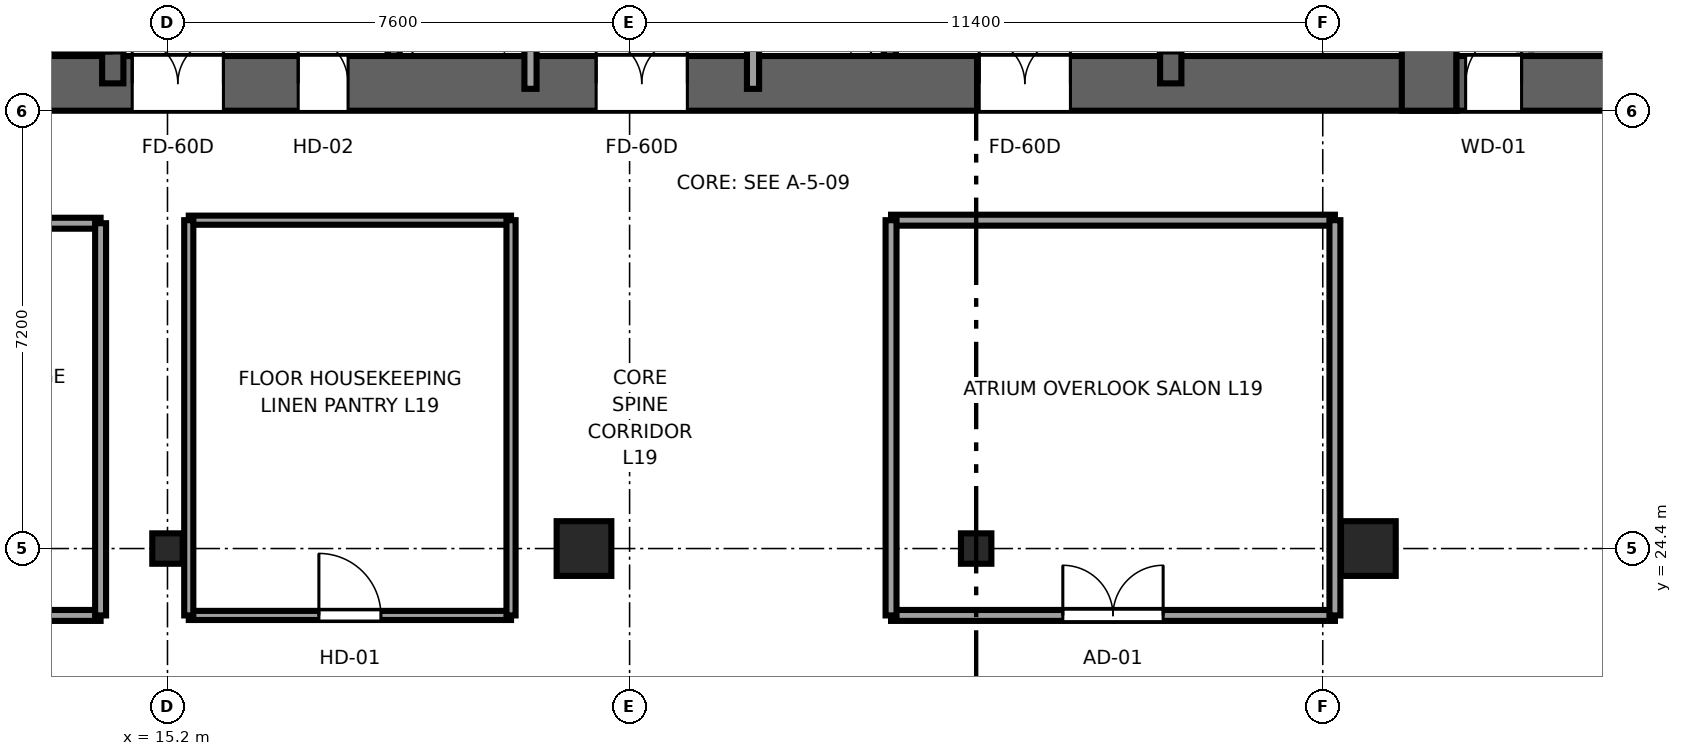
"""IFC4 building model, lengths in metres.
Left out: names, types, materials, properties, quantities, classifications, styles, units other than length and angle.
Written with IfcOpenShell. Run it as: python <this file> out.ifc"""

import sys

from ifc_helpers import new_model, si_unit, direction, frame, frame_2d, origin, origin_2d, place, context, subcontext, project, spatial, rectangle, i_section, extrude, source, transform, mapped, element, fill, save


model = new_model("IFC4")
c1 = context("Model", 3, precision=1e-05, world=origin(), true_north=direction((0.0, 1.0)))
c2 = subcontext(c1, "Body", "Model", "MODEL_VIEW")
j1 = project(units=[si_unit("LENGTHUNIT", "METRE"), si_unit("PLANEANGLEUNIT", "RADIAN")], contexts=[c1])
p1 = place(None, origin())
s1 = spatial("IfcSite", under=j1, at=p1, CompositionType="ELEMENT")
p2 = place(p1, origin())
s2 = spatial("IfcBuilding", under=s1, at=p2, CompositionType="ELEMENT")
p3 = place(p2, frame((0.0, 0.0, 78.15)))
s3 = spatial("IfcBuildingStorey", under=s2, at=p3, CompositionType="ELEMENT", Elevation=78.15)
p4 = place(p3, frame((9.6, 32.05, 0.0), z_axis=(0.0, 0.0, 1.0), x_axis=(1.0, 0.0, 0.0)))
e1 = element("IfcWall", 1, at=p4, inside=s3, PredefinedType="SHEAR", context=c2, shape_type="SweptSolid", body=[
    extrude(rectangle(XDim=26.8, YDim=0.9, at=frame_2d((13.4, 0.0))), origin(), (0.0, 0.0, 1.0), 3.55),
])
p5 = place(p4, frame((6.52, 0.0, 0.0), z_axis=(0.0, 0.0, 1.0), x_axis=(-1.0, 0.0, 0.0)))
e2 = element("IfcOpeningElement", 2, at=p5, cuts=e1, PredefinedType="OPENING", context=c2, shape_type="SweptSolid", body=[
    extrude(rectangle(XDim=1.5, YDim=2.04, at=frame_2d((0.75, 1.02))), frame((0.0, 0.46, 0.0), z_axis=(0.0, -1.0, 0.0), x_axis=(1.0, 0.0, 0.0)), (0.0, 0.0, 1.0), 0.92),
])
p6 = place(p4, frame((14.15, 0.0, 0.0), z_axis=(0.0, 0.0, 1.0), x_axis=(-1.0, 0.0, 0.0)))
e3 = element("IfcOpeningElement", 3, at=p6, cuts=e1, PredefinedType="OPENING", context=c2, shape_type="SweptSolid", body=[
    extrude(rectangle(XDim=1.5, YDim=2.04, at=frame_2d((0.75, 1.02))), frame((0.0, 0.46, 0.0), z_axis=(0.0, -1.0, 0.0), x_axis=(1.0, 0.0, 0.0)), (0.0, 0.0, 1.0), 0.92),
])
p7 = place(p4, frame((20.45, 0.0, 0.0), z_axis=(0.0, 0.0, 1.0), x_axis=(-1.0, 0.0, 0.0)))
e4 = element("IfcOpeningElement", 4, at=p7, cuts=e1, PredefinedType="OPENING", context=c2, shape_type="SweptSolid", body=[
    extrude(rectangle(XDim=1.5, YDim=2.04, at=frame_2d((0.75, 1.02))), frame((0.0, 0.46, 0.0), z_axis=(0.0, -1.0, 0.0), x_axis=(1.0, 0.0, 0.0)), (0.0, 0.0, 1.0), 0.92),
])
p8 = place(p4, frame((8.57, 0.0, 0.0), z_axis=(0.0, 0.0, 1.0), x_axis=(-1.0, 0.0, 0.0)))
e5 = element("IfcOpeningElement", 5, at=p8, cuts=e1, PredefinedType="OPENING", context=c2, shape_type="SweptSolid", body=[
    extrude(rectangle(XDim=0.82, YDim=2.01, at=frame_2d((0.41, 1.005))), frame((0.0, 0.46, 0.0), z_axis=(0.0, -1.0, 0.0), x_axis=(1.0, 0.0, 0.0)), (0.0, 0.0, 1.0), 0.92),
])
p9 = place(p3, frame((35.95, 31.6, 0.0), z_axis=(0.0, 0.0, 1.0), x_axis=(0.0, 1.0, 0.0)))
e6 = element("IfcWall", 6, at=p9, inside=s3, PredefinedType="SHEAR", context=c2, shape_type="SweptSolid", body=[
    extrude(rectangle(XDim=13.6, YDim=0.9, at=frame_2d((6.8, 0.0))), origin(), (0.0, 0.0, 1.0), 3.55),
])
p10 = place(p3, frame((14.3, 32.05, 0.0), z_axis=(0.0, 0.0, 1.0), x_axis=(0.0, 1.0, 0.0)))
e7 = element("IfcWall", 7, at=p10, inside=s3, PredefinedType="SHEAR", context=c2, shape_type="SweptSolid", body=[
    extrude(rectangle(XDim=12.7, YDim=0.35, at=frame_2d((6.35, 0.0))), origin(), (0.0, 0.0, 1.0), 3.55),
])
p11 = place(p10, frame((0.5, 0.0, 0.0)))
e8 = element("IfcOpeningElement", 8, at=p11, cuts=e7, PredefinedType="OPENING", context=c2, shape_type="SweptSolid", body=[
    extrude(rectangle(XDim=1.1, YDim=2.12, at=frame_2d((0.55, 1.06))), frame((0.0, 0.185, 0.0), z_axis=(0.0, -1.0, 0.0), x_axis=(1.0, 0.0, 0.0)), (0.0, 0.0, 1.0), 0.37),
])
p12 = place(p3, frame((31.7, 32.05, 0.0), z_axis=(0.0, 0.0, 1.0), x_axis=(0.0, 1.0, 0.0)))
e9 = element("IfcWall", 9, at=p12, inside=s3, PredefinedType="SHEAR", context=c2, shape_type="SweptSolid", body=[
    extrude(rectangle(XDim=12.7, YDim=0.35, at=frame_2d((6.35, 0.0))), origin(), (0.0, 0.0, 1.0), 3.55),
])
p13 = place(p12, frame((1.6, 0.0, 0.0), z_axis=(0.0, 0.0, 1.0), x_axis=(-1.0, 0.0, 0.0)))
e10 = element("IfcOpeningElement", 10, at=p13, cuts=e9, PredefinedType="OPENING", context=c2, shape_type="SweptSolid", body=[
    extrude(rectangle(XDim=1.1, YDim=2.12, at=frame_2d((0.55, 1.06))), frame((0.0, 0.185, 0.0), z_axis=(0.0, -1.0, 0.0), x_axis=(1.0, 0.0, 0.0)), (0.0, 0.0, 1.0), 0.37),
])
p14 = place(p3, frame((36.4, 32.05, 0.0), z_axis=(0.0, 0.0, 1.0), x_axis=(1.0, 0.0, 0.0)))
e11 = element("IfcWall", 11, at=p14, inside=s3, PredefinedType="SHEAR", context=c2, shape_type="SweptSolid", body=[
    extrude(rectangle(XDim=4.0, YDim=0.9, at=frame_2d((2.0, 0.0))), origin(), (0.0, 0.0, 1.0), 3.55),
])
p15 = place(p14, frame((1.07, 0.0, 0.0), z_axis=(0.0, 0.0, 1.0), x_axis=(-1.0, 0.0, 0.0)))
e12 = element("IfcOpeningElement", 12, at=p15, cuts=e11, PredefinedType="OPENING", context=c2, shape_type="SweptSolid", body=[
    extrude(rectangle(XDim=0.92, YDim=2.01, at=frame_2d((0.46, 1.005))), frame((0.0, 0.46, 0.0), z_axis=(0.0, -1.0, 0.0), x_axis=(1.0, 0.0, 0.0)), (0.0, 0.0, 1.0), 0.92),
])
m1 = source(origin(), c2, "Body", "SweptSolid", [
    extrude(i_section(OverallWidth=0.5, OverallDepth=0.5, WebThickness=0.022, FlangeThickness=0.034, at=origin_2d()), origin(), (0.0, 0.0, 1.0), 3.55),
])
p16 = place(p3, frame((15.2, 24.4, 0.0), z_axis=(0.0, 0.0, 1.0), x_axis=(1.0, 0.0, 0.0)))
e13 = element("IfcColumn", 13, at=p16, inside=s3, PredefinedType="COLUMN", context=c2, shape_type="MappedRepresentation", body=[
    mapped(m1, transform((0.0, 0.0, 0.0), x_axis=(1.0, 0.0, 0.0), y_axis=(0.0, 1.0, 0.0), z_axis=(0.0, 0.0, 1.0), scale=1.0)),
])
m2 = source(origin(), c2, "Body", "SweptSolid", [
    extrude(rectangle(XDim=0.9, YDim=0.9, at=origin_2d()), origin(), (0.0, 0.0, 1.0), 3.55),
])
for number, where, z_axis, x_axis in (
    (14, (22.05, 24.4, 0.0), (0.0, 0.0, 1.0), (1.0, 0.0, 0.0)),
    (15, (34.95, 24.4, 0.0), (0.0, 0.0, 1.0), (1.0, 0.0, 0.0)),
):
    element("IfcColumn", number, at=place(p3, frame(where, z_axis=z_axis, x_axis=x_axis)), inside=s3, PredefinedType="COLUMN", context=c2, shape_type="MappedRepresentation", body=[
        mapped(m2, transform((0.0, 0.0, 0.0), x_axis=(1.0, 0.0, 0.0), y_axis=(0.0, 1.0, 0.0), z_axis=(0.0, 0.0, 1.0), scale=1.0)),
    ])
p17 = place(p3, frame((28.5, 24.4, 0.0), z_axis=(0.0, 0.0, 1.0), x_axis=(1.0, 0.0, 0.0)))
e16 = element("IfcColumn", 16, at=p17, inside=s3, PredefinedType="COLUMN", context=c2, shape_type="MappedRepresentation", body=[
    mapped(m1, transform((0.0, 0.0, 0.0), x_axis=(1.0, 0.0, 0.0), y_axis=(0.0, 1.0, 0.0), z_axis=(0.0, 0.0, 1.0), scale=1.0)),
])
for number, where, z_axis, x_axis in (
    (17, (18.92, 32.504, 0.0), (0.0, 0.0, 1.0), (0.0, 1.0, 0.0)),
    (18, (27.08, 32.504, 0.0), (0.0, 0.0, 1.0), (0.0, 1.0, 0.0)),
):
    element("IfcWall", number, at=place(p3, frame(where, z_axis=z_axis, x_axis=x_axis)), inside=s3, PredefinedType="SOLIDWALL", context=c2, shape_type="SweptSolid", body=[
        extrude(rectangle(XDim=3.646, YDim=0.2, at=frame_2d((1.823, 0.0))), origin(), (0.0, 0.0, 1.0), 3.37),
    ])
for number, where, z_axis, x_axis in (
    (19, (21.17, 31.96, 0.0), (0.0, 0.0, 1.0), (0.0, 1.0, 0.0)),
    (20, (24.83, 31.96, 0.0), (0.0, 0.0, 1.0), (0.0, 1.0, 0.0)),
):
    element("IfcWall", number, at=place(p3, frame(where, z_axis=z_axis, x_axis=x_axis)), inside=s3, PredefinedType="SOLIDWALL", context=c2, shape_type="SweptSolid", body=[
        extrude(rectangle(XDim=12.58, YDim=0.2, at=frame_2d((6.29, 0.0))), origin(), (0.0, 0.0, 1.0), 3.37),
    ])
p18 = place(p3, frame((9.88, 23.3, 0.0), z_axis=(0.0, 0.0, 1.0), x_axis=(1.0, 0.0, 0.0)))
e21 = element("IfcWall", 21, at=p18, inside=s3, PredefinedType="PARTITIONING", context=c2, shape_type="SweptSolid", body=[
    extrude(rectangle(XDim=4.22, YDim=0.18, at=frame_2d((2.11, 0.0))), origin(), (0.0, 0.0, 1.0), 3.37),
])
p19 = place(p18, frame((1.285, 0.0, 0.0)))
e22 = element("IfcOpeningElement", 22, at=p19, cuts=e21, PredefinedType="OPENING", context=c2, shape_type="SweptSolid", body=[
    extrude(rectangle(XDim=1.65, YDim=2.15, at=frame_2d((0.825, 1.075))), frame((0.0, 0.1, 0.0), z_axis=(0.0, -1.0, 0.0), x_axis=(1.0, 0.0, 0.0)), (0.0, 0.0, 1.0), 0.2),
])
p20 = place(p3, frame((9.88, 29.75, 0.0), z_axis=(0.0, 0.0, 1.0), x_axis=(1.0, 0.0, 0.0)))
e23 = element("IfcWall", 23, at=p20, inside=s3, PredefinedType="PARTITIONING", context=c2, shape_type="SweptSolid", body=[
    extrude(rectangle(XDim=4.22, YDim=0.18, at=frame_2d((2.11, 0.0))), origin(), (0.0, 0.0, 1.0), 3.37),
])
p21 = place(p3, frame((14.1, 23.3, 0.0), z_axis=(0.0, 0.0, 1.0), x_axis=(0.0, 1.0, 0.0)))
e24 = element("IfcWall", 24, at=p21, inside=s3, PredefinedType="PARTITIONING", context=c2, shape_type="SweptSolid", body=[
    extrude(rectangle(XDim=6.45, YDim=0.18, at=frame_2d((3.225, 0.0))), origin(), (0.0, 0.0, 1.0), 3.37),
])
p22 = place(p3, frame((27.1, 23.3, 0.0), z_axis=(0.0, 0.0, 1.0), x_axis=(1.0, 0.0, 0.0)))
e25 = element("IfcWall", 25, at=p22, inside=s3, PredefinedType="PARTITIONING", context=c2, shape_type="SweptSolid", body=[
    extrude(rectangle(XDim=7.3, YDim=0.18, at=frame_2d((3.65, 0.0))), origin(), (0.0, 0.0, 1.0), 3.37),
])
p23 = place(p22, frame((2.825, 0.0, 0.0)))
e26 = element("IfcOpeningElement", 26, at=p23, cuts=e25, PredefinedType="OPENING", context=c2, shape_type="SweptSolid", body=[
    extrude(rectangle(XDim=1.65, YDim=2.15, at=frame_2d((0.825, 1.075))), frame((0.0, 0.1, 0.0), z_axis=(0.0, -1.0, 0.0), x_axis=(1.0, 0.0, 0.0)), (0.0, 0.0, 1.0), 0.2),
])
p24 = place(p3, frame((27.1, 29.8, 0.0), z_axis=(0.0, 0.0, 1.0), x_axis=(1.0, 0.0, 0.0)))
e27 = element("IfcWall", 27, at=p24, inside=s3, PredefinedType="PARTITIONING", context=c2, shape_type="SweptSolid", body=[
    extrude(rectangle(XDim=7.3, YDim=0.18, at=frame_2d((3.65, 0.0))), origin(), (0.0, 0.0, 1.0), 3.37),
])
for number, where, z_axis, x_axis in (
    (28, (27.1, 23.3, 0.0), (0.0, 0.0, 1.0), (0.0, 1.0, 0.0)),
    (29, (34.4, 23.3, 0.0), (0.0, 0.0, 1.0), (0.0, 1.0, 0.0)),
):
    element("IfcWall", number, at=place(p3, frame(where, z_axis=z_axis, x_axis=x_axis)), inside=s3, PredefinedType="PARTITIONING", context=c2, shape_type="SweptSolid", body=[
        extrude(rectangle(XDim=6.5, YDim=0.18, at=frame_2d((3.25, 0.0))), origin(), (0.0, 0.0, 1.0), 3.37),
    ])
p25 = place(p3, frame((15.55, 23.3, 0.0), z_axis=(0.0, 0.0, 1.0), x_axis=(1.0, 0.0, 0.0)))
e30 = element("IfcWall", 30, at=p25, inside=s3, PredefinedType="PARTITIONING", context=c2, shape_type="SweptSolid", body=[
    extrude(rectangle(XDim=5.3, YDim=0.15, at=frame_2d((2.65, 0.0))), origin(), (0.0, 0.0, 1.0), 3.37),
])
p26 = place(p25, frame((2.14, 0.0, 0.0)))
e31 = element("IfcOpeningElement", 31, at=p26, cuts=e30, PredefinedType="OPENING", context=c2, shape_type="SweptSolid", body=[
    extrude(rectangle(XDim=1.02, YDim=2.03, at=frame_2d((0.51, 1.015))), frame((0.0, 0.085, 0.0), z_axis=(0.0, -1.0, 0.0), x_axis=(1.0, 0.0, 0.0)), (0.0, 0.0, 1.0), 0.17),
])
p27 = place(p3, frame((15.55, 29.8, 0.0), z_axis=(0.0, 0.0, 1.0), x_axis=(1.0, 0.0, 0.0)))
e32 = element("IfcWall", 32, at=p27, inside=s3, PredefinedType="PARTITIONING", context=c2, shape_type="SweptSolid", body=[
    extrude(rectangle(XDim=5.3, YDim=0.15, at=frame_2d((2.65, 0.0))), origin(), (0.0, 0.0, 1.0), 3.37),
])
for number, where, z_axis, x_axis in (
    (33, (15.55, 23.3, 0.0), (0.0, 0.0, 1.0), (0.0, 1.0, 0.0)),
    (34, (20.85, 23.3, 0.0), (0.0, 0.0, 1.0), (0.0, 1.0, 0.0)),
):
    element("IfcWall", number, at=place(p3, frame(where, z_axis=z_axis, x_axis=x_axis)), inside=s3, PredefinedType="PARTITIONING", context=c2, shape_type="SweptSolid", body=[
        extrude(rectangle(XDim=6.5, YDim=0.15, at=frame_2d((3.25, 0.0))), origin(), (0.0, 0.0, 1.0), 3.37),
    ])
m3 = source(origin(), c2, "Body", "SweptSolid", [
    extrude(rectangle(XDim=1.1, YDim=2.12, at=frame_2d((0.55, 1.06))), frame((0.0, 0.025, 0.0), z_axis=(0.0, -1.0, 0.0), x_axis=(1.0, 0.0, 0.0)), (0.0, 0.0, 1.0), 0.05),
])
p28 = place(p11, origin())
e35 = element("IfcDoor", 35, at=p28, inside=s3, OperationType="SINGLE_SWING_LEFT", PredefinedType="DOOR", context=c2, shape_type="MappedRepresentation", body=[
    mapped(m3, transform((0.0, 0.0, 0.0), x_axis=(1.0, 0.0, 0.0), y_axis=(0.0, 1.0, 0.0), z_axis=(0.0, 0.0, 1.0), scale=1.0)),
])
fill(e8, e35)
p29 = place(p13, origin())
e36 = element("IfcDoor", 36, at=p29, inside=s3, OperationType="SINGLE_SWING_RIGHT", PredefinedType="DOOR", context=c2, shape_type="MappedRepresentation", body=[
    mapped(m3, transform((0.0, 0.0, 0.0), x_axis=(1.0, 0.0, 0.0), y_axis=(0.0, 1.0, 0.0), z_axis=(0.0, 0.0, 1.0), scale=1.0)),
])
fill(e10, e36)
m4 = source(origin(), c2, "Body", "SweptSolid", [
    extrude(rectangle(XDim=1.5, YDim=2.04, at=frame_2d((0.75, 1.02))), frame((0.0, 0.025, 0.0), z_axis=(0.0, -1.0, 0.0), x_axis=(1.0, 0.0, 0.0)), (0.0, 0.0, 1.0), 0.05),
])
p30 = place(p5, origin())
e37 = element("IfcDoor", 37, at=p30, inside=s3, OperationType="DOUBLE_DOOR_SINGLE_SWING", PredefinedType="DOOR", context=c2, shape_type="MappedRepresentation", body=[
    mapped(m4, transform((0.0, 0.0, 0.0), x_axis=(1.0, 0.0, 0.0), y_axis=(0.0, 1.0, 0.0), z_axis=(0.0, 0.0, 1.0), scale=1.0)),
])
fill(e2, e37)
p31 = place(p6, origin())
e38 = element("IfcDoor", 38, at=p31, inside=s3, OperationType="DOUBLE_DOOR_SINGLE_SWING", PredefinedType="DOOR", context=c2, shape_type="MappedRepresentation", body=[
    mapped(m4, transform((0.0, 0.0, 0.0), x_axis=(1.0, 0.0, 0.0), y_axis=(0.0, 1.0, 0.0), z_axis=(0.0, 0.0, 1.0), scale=1.0)),
])
fill(e3, e38)
p32 = place(p7, origin())
e39 = element("IfcDoor", 39, at=p32, inside=s3, OperationType="DOUBLE_DOOR_SINGLE_SWING", PredefinedType="DOOR", context=c2, shape_type="MappedRepresentation", body=[
    mapped(m4, transform((0.0, 0.0, 0.0), x_axis=(1.0, 0.0, 0.0), y_axis=(0.0, 1.0, 0.0), z_axis=(0.0, 0.0, 1.0), scale=1.0)),
])
fill(e4, e39)
m5 = source(origin(), c2, "Body", "SweptSolid", [
    extrude(rectangle(XDim=0.82, YDim=2.01, at=frame_2d((0.41, 1.005))), frame((0.0, 0.025, 0.0), z_axis=(0.0, -1.0, 0.0), x_axis=(1.0, 0.0, 0.0)), (0.0, 0.0, 1.0), 0.05),
])
p33 = place(p8, origin())
e40 = element("IfcDoor", 40, at=p33, inside=s3, OperationType="SINGLE_SWING_LEFT", PredefinedType="DOOR", context=c2, shape_type="MappedRepresentation", body=[
    mapped(m5, transform((0.0, 0.0, 0.0), x_axis=(1.0, 0.0, 0.0), y_axis=(0.0, 1.0, 0.0), z_axis=(0.0, 0.0, 1.0), scale=1.0)),
])
fill(e5, e40)
m6 = source(origin(), c2, "Body", "SweptSolid", [
    extrude(rectangle(XDim=0.92, YDim=2.01, at=frame_2d((0.46, 1.005))), frame((0.0, 0.025, 0.0), z_axis=(0.0, -1.0, 0.0), x_axis=(1.0, 0.0, 0.0)), (0.0, 0.0, 1.0), 0.05),
])
p34 = place(p15, origin())
e41 = element("IfcDoor", 41, at=p34, inside=s3, OperationType="SINGLE_SWING_RIGHT", PredefinedType="DOOR", context=c2, shape_type="MappedRepresentation", body=[
    mapped(m6, transform((0.0, 0.0, 0.0), x_axis=(1.0, 0.0, 0.0), y_axis=(0.0, 1.0, 0.0), z_axis=(0.0, 0.0, 1.0), scale=1.0)),
])
fill(e12, e41)
m7 = source(origin(), c2, "Body", "SweptSolid", [
    extrude(rectangle(XDim=1.65, YDim=2.15, at=frame_2d((0.825, 1.075))), frame((0.0, 0.025, 0.0), z_axis=(0.0, -1.0, 0.0), x_axis=(1.0, 0.0, 0.0)), (0.0, 0.0, 1.0), 0.05),
])
p35 = place(p23, origin())
e42 = element("IfcDoor", 42, at=p35, inside=s3, OperationType="DOUBLE_DOOR_SINGLE_SWING", PredefinedType="DOOR", context=c2, shape_type="MappedRepresentation", body=[
    mapped(m7, transform((0.0, 0.0, 0.0), x_axis=(1.0, 0.0, 0.0), y_axis=(0.0, 1.0, 0.0), z_axis=(0.0, 0.0, 1.0), scale=1.0)),
])
fill(e26, e42)
m8 = source(origin(), c2, "Body", "SweptSolid", [
    extrude(rectangle(XDim=1.02, YDim=2.03, at=frame_2d((0.51, 1.015))), frame((0.0, 0.025, 0.0), z_axis=(0.0, -1.0, 0.0), x_axis=(1.0, 0.0, 0.0)), (0.0, 0.0, 1.0), 0.05),
])
p36 = place(p26, origin())
e43 = element("IfcDoor", 43, at=p36, inside=s3, OperationType="SINGLE_SWING_LEFT", PredefinedType="DOOR", context=c2, shape_type="MappedRepresentation", body=[
    mapped(m8, transform((0.0, 0.0, 0.0), x_axis=(1.0, 0.0, 0.0), y_axis=(0.0, 1.0, 0.0), z_axis=(0.0, 0.0, 1.0), scale=1.0)),
])
fill(e31, e43)
save(model, sys.argv[1])
